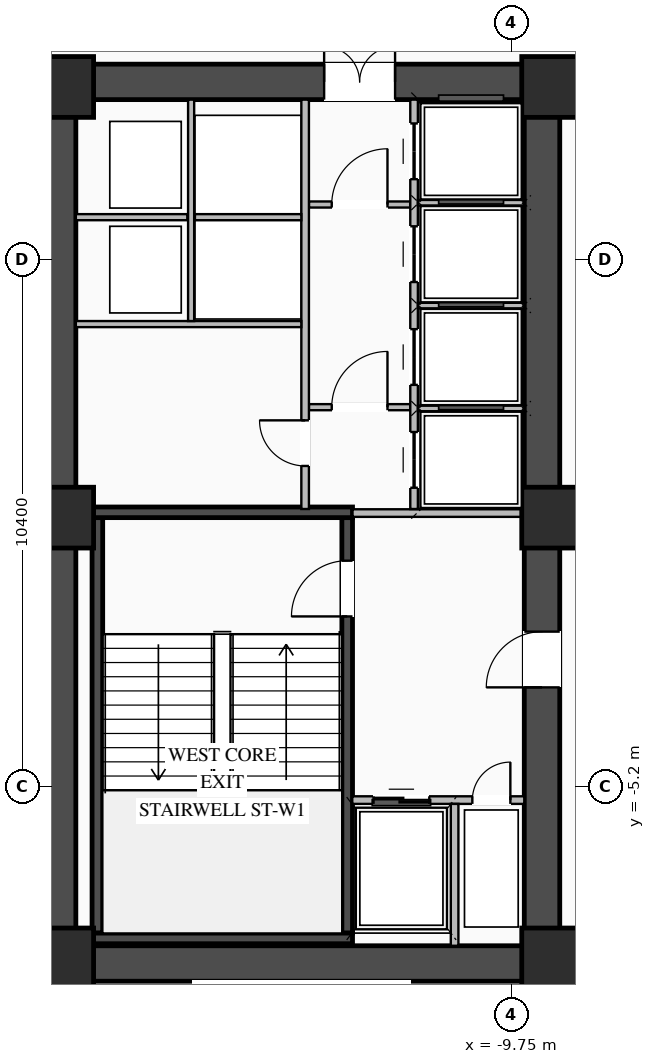
"""IFC4 building model, lengths in metres.
Left out: names, types, materials, properties, quantities, classifications, styles, units other than length and angle.
Written with IfcOpenShell. Run it as: python <this file> out.ifc"""

import sys

from ifc_helpers import new_model, si_unit, direction, frame, frame_2d, origin, origin_2d, place, context, subcontext, project, spatial, rectangle, extrude, element, fill, save


model = new_model("IFC4")
c1 = context("Model", 3, precision=1e-05, world=origin(), true_north=direction((0.0, 1.0)))
c2 = subcontext(c1, "Body", "Model", "MODEL_VIEW")
j1 = project(units=[si_unit("LENGTHUNIT", "METRE"), si_unit("PLANEANGLEUNIT", "RADIAN")], contexts=[c1])
p1 = place(None, origin())
s1 = spatial("IfcSite", under=j1, at=p1, CompositionType="ELEMENT")
p2 = place(p1, origin())
s2 = spatial("IfcBuilding", under=s1, at=p2, CompositionType="ELEMENT")
p3 = place(p2, frame((0.0, 0.0, 9.6)))
s3 = spatial("IfcBuildingStorey", under=s2, at=p3, CompositionType="ELEMENT", Elevation=9.6)
p4 = place(p3, frame((-19.05, -8.7, 0.0), z_axis=(0.0, 0.0, 1.0), x_axis=(1.0, 0.0, 0.0)))
e1 = element("IfcWall", 1, at=p4, inside=s3, PredefinedType="SHEAR", context=c2, shape_type="SweptSolid", body=[
    extrude(rectangle(XDim=10.25, YDim=0.7, at=frame_2d((5.125, 0.0))), origin(), (0.0, 0.0, 1.0), 4.25),
])
p5 = place(p3, frame((-19.05, 8.7, 0.0), z_axis=(0.0, 0.0, 1.0), x_axis=(1.0, 0.0, 0.0)))
e2 = element("IfcWall", 2, at=p5, inside=s3, PredefinedType="SHEAR", context=c2, shape_type="SweptSolid", body=[
    extrude(rectangle(XDim=10.25, YDim=0.7, at=frame_2d((5.125, 0.0))), origin(), (0.0, 0.0, 1.0), 4.25),
])
p6 = place(p5, frame((5.6, 0.0, 0.0)))
e3 = element("IfcOpeningElement", 3, at=p6, cuts=e2, PredefinedType="OPENING", context=c2, shape_type="SweptSolid", body=[
    extrude(rectangle(XDim=1.4, YDim=2.05, at=frame_2d((0.7, 1.025))), frame((0.0, 0.36, 0.0), z_axis=(0.0, -1.0, 0.0), x_axis=(1.0, 0.0, 0.0)), (0.0, 0.0, 1.0), 0.72),
])
p7 = place(p3, frame((-18.7, -8.35, 0.0), z_axis=(0.0, 0.0, 1.0), x_axis=(0.0, 1.0, 0.0)))
e4 = element("IfcWall", 4, at=p7, inside=s3, PredefinedType="SHEAR", context=c2, shape_type="SweptSolid", body=[
    extrude(rectangle(XDim=16.7, YDim=0.7, at=frame_2d((8.35, 0.0))), origin(), (0.0, 0.0, 1.0), 4.25),
])
p8 = place(p3, frame((-9.15, -8.35, 0.0), z_axis=(0.0, 0.0, 1.0), x_axis=(0.0, 1.0, 0.0)))
e5 = element("IfcWall", 5, at=p8, inside=s3, PredefinedType="SHEAR", context=c2, shape_type="SweptSolid", body=[
    extrude(rectangle(XDim=16.7, YDim=0.7, at=frame_2d((8.35, 0.0))), origin(), (0.0, 0.0, 1.0), 4.25),
])
p9 = place(p8, frame((5.1, 0.0, 0.0)))
e6 = element("IfcOpeningElement", 6, at=p9, cuts=e5, PredefinedType="OPENING", context=c2, shape_type="SweptSolid", body=[
    extrude(rectangle(XDim=1.1, YDim=2.08, at=frame_2d((0.55, 1.04))), frame((0.0, 0.36, 0.0), z_axis=(0.0, -1.0, 0.0), x_axis=(1.0, 0.0, 0.0)), (0.0, 0.0, 1.0), 0.72),
])
p10 = place(p3, frame((-12.995, -8.1, 0.0), z_axis=(0.0, 0.0, 1.0), x_axis=(0.0, 1.0, 0.0)))
e7 = element("IfcWall", 7, at=p10, inside=s3, PredefinedType="SHEAR", context=c2, shape_type="SweptSolid", body=[
    extrude(rectangle(XDim=8.2, YDim=0.21, at=frame_2d((4.1, 0.0))), origin(), (0.0, 0.0, 1.0), 4.25),
])
p11 = place(p10, frame((6.25, 0.0, 0.0)))
e8 = element("IfcOpeningElement", 8, at=p11, cuts=e7, PredefinedType="OPENING", context=c2, shape_type="SweptSolid", body=[
    extrude(rectangle(XDim=1.1, YDim=2.15, at=frame_2d((0.55, 1.075))), frame((0.0, 0.115, 0.0), z_axis=(0.0, -1.0, 0.0), x_axis=(1.0, 0.0, 0.0)), (0.0, 0.0, 1.0), 0.23),
])
p12 = place(p3, frame((-17.925, -8.1, 0.0), z_axis=(0.0, 0.0, 1.0), x_axis=(0.0, 1.0, 0.0)))
e9 = element("IfcWall", 9, at=p12, inside=s3, PredefinedType="SHEAR", context=c2, shape_type="SweptSolid", body=[
    extrude(rectangle(XDim=8.2, YDim=0.21, at=frame_2d((4.1, 0.0))), origin(), (0.0, 0.0, 1.0), 4.25),
])
for number, where, z_axis, x_axis in (
    (10, (-18.03, -8.205, 0.0), (0.0, 0.0, 1.0), (1.0, 0.0, 0.0)),
    (11, (-12.89, 0.205, 0.0), (0.0, 0.0, 1.0), (-1.0, 0.0, 0.0)),
):
    element("IfcWall", number, at=place(p3, frame(where, z_axis=z_axis, x_axis=x_axis)), inside=s3, PredefinedType="SHEAR", context=c2, shape_type="SweptSolid", body=[
        extrude(rectangle(XDim=5.14, YDim=0.21, at=frame_2d((2.57, 0.0))), origin(), (0.0, 0.0, 1.0), 4.25),
    ])
for number, where, z_axis, x_axis in (
    (12, (-8.95, -8.6, 0.0), (0.0, 0.0, 1.0), (1.0, 0.0, 0.0)),
    (13, (-8.95, 0.1, 0.0), (0.0, 0.0, 1.0), (1.0, 0.0, 0.0)),
    (14, (-8.95, 8.6, 0.0), (0.0, 0.0, 1.0), (1.0, 0.0, 0.0)),
    (15, (-18.6, -8.6, 0.0), (0.0, 0.0, 1.0), (1.0, 0.0, 0.0)),
    (16, (-18.6, 0.1, 0.0), (0.0, 0.0, 1.0), (1.0, 0.0, 0.0)),
    (17, (-18.6, 8.6, 0.0), (0.0, 0.0, 1.0), (1.0, 0.0, 0.0)),
):
    element("IfcColumn", number, at=place(p3, frame(where, z_axis=z_axis, x_axis=x_axis)), inside=s3, PredefinedType="COLUMN", context=c2, shape_type="SweptSolid", body=[
        extrude(rectangle(XDim=1.2, YDim=1.2, at=origin_2d()), origin(), (0.0, 0.0, 1.0), 4.5),
    ])
p13 = place(p3, frame((-12.895, -5.475, 0.0), z_axis=(0.0, 0.0, 1.0), x_axis=(1.0, 0.0, 0.0)))
e18 = element("IfcWall", 18, at=p13, inside=s3, PredefinedType="STANDARD", context=c2, shape_type="SweptSolid", body=[
    extrude(rectangle(XDim=3.395, YDim=0.15, at=frame_2d((1.698, 0.0))), origin(), (0.0, 0.0, 1.0), 4.23),
])
p14 = place(p13, frame((0.42, 0.0, 0.0)))
e19 = element("IfcOpeningElement", 19, at=p14, cuts=e18, PredefinedType="OPENING", context=c2, shape_type="SweptSolid", body=[
    extrude(rectangle(XDim=1.1, YDim=2.15, at=frame_2d((0.55, 1.075))), frame((0.0, 0.085, 0.0), z_axis=(0.0, -1.0, 0.0), x_axis=(1.0, 0.0, 0.0)), (0.0, 0.0, 1.0), 0.17),
])
p15 = place(p13, frame((2.37, 0.0, 0.0)))
e20 = element("IfcOpeningElement", 20, at=p15, cuts=e18, PredefinedType="OPENING", context=c2, shape_type="SweptSolid", body=[
    extrude(rectangle(XDim=0.75, YDim=2.05, at=frame_2d((0.375, 1.025))), frame((0.0, 0.085, 0.0), z_axis=(0.0, -1.0, 0.0), x_axis=(1.0, 0.0, 0.0)), (0.0, 0.0, 1.0), 0.17),
])
p16 = place(p3, frame((-10.875, -8.35, 0.0), z_axis=(0.0, 0.0, 1.0), x_axis=(0.0, 1.0, 0.0)))
e21 = element("IfcWall", 21, at=p16, inside=s3, PredefinedType="STANDARD", context=c2, shape_type="SweptSolid", body=[
    extrude(rectangle(XDim=2.8, YDim=0.15, at=frame_2d((1.4, 0.0))), origin(), (0.0, 0.0, 1.0), 4.23),
])
p17 = place(p3, frame((-12.89, 0.19, 0.0), z_axis=(0.0, 0.0, 1.0), x_axis=(1.0, 0.0, 0.0)))
e22 = element("IfcWall", 22, at=p17, inside=s3, PredefinedType="STANDARD", context=c2, shape_type="SweptSolid", body=[
    extrude(rectangle(XDim=3.39, YDim=0.15, at=frame_2d((1.695, 0.0))), origin(), (0.0, 0.0, 1.0), 3.525),
])
p18 = place(p3, frame((-13.75, 2.28, 0.0), z_axis=(0.0, 0.0, 1.0), x_axis=(1.0, 0.0, 0.0)))
e23 = element("IfcWall", 23, at=p18, inside=s3, PredefinedType="STANDARD", context=c2, shape_type="SweptSolid", body=[
    extrude(rectangle(XDim=2.0, YDim=0.12, at=frame_2d((1.0, 0.0))), origin(), (0.0, 0.0, 1.0), 4.23),
])
p19 = place(p18, frame((0.45, 0.0, 0.0)))
e24 = element("IfcOpeningElement", 24, at=p19, cuts=e23, PredefinedType="OPENING", context=c2, shape_type="SweptSolid", body=[
    extrude(rectangle(XDim=1.1, YDim=2.1, at=frame_2d((0.55, 1.05))), frame((0.0, 0.07, 0.0), z_axis=(0.0, -1.0, 0.0), x_axis=(1.0, 0.0, 0.0)), (0.0, 0.0, 1.0), 0.14),
])
p20 = place(p3, frame((-13.75, 6.28, 0.0), z_axis=(0.0, 0.0, 1.0), x_axis=(1.0, 0.0, 0.0)))
e25 = element("IfcWall", 25, at=p20, inside=s3, PredefinedType="STANDARD", context=c2, shape_type="SweptSolid", body=[
    extrude(rectangle(XDim=2.0, YDim=0.12, at=frame_2d((1.0, 0.0))), origin(), (0.0, 0.0, 1.0), 4.23),
])
p21 = place(p20, frame((0.45, 0.0, 0.0)))
e26 = element("IfcOpeningElement", 26, at=p21, cuts=e25, PredefinedType="OPENING", context=c2, shape_type="SweptSolid", body=[
    extrude(rectangle(XDim=1.1, YDim=2.1, at=frame_2d((0.55, 1.05))), frame((0.0, 0.07, 0.0), z_axis=(0.0, -1.0, 0.0), x_axis=(1.0, 0.0, 0.0)), (0.0, 0.0, 1.0), 0.14),
])
p22 = place(p3, frame((-11.675, 0.27, 0.0), z_axis=(0.0, 0.0, 1.0), x_axis=(0.0, 1.0, 0.0)))
e27 = element("IfcWall", 27, at=p22, inside=s3, PredefinedType="STANDARD", context=c2, shape_type="SweptSolid", body=[
    extrude(rectangle(XDim=8.08, YDim=0.15, at=frame_2d((4.04, 0.0))), origin(), (0.0, 0.0, 1.0), 4.23),
])
p23 = place(p22, frame((0.42, 0.0, 0.0)))
e28 = element("IfcOpeningElement", 28, at=p23, cuts=e27, PredefinedType="OPENING", context=c2, shape_type="SweptSolid", body=[
    extrude(rectangle(XDim=1.1, YDim=2.1, at=frame_2d((0.55, 1.05))), frame((0.0, 0.085, 0.0), z_axis=(0.0, -1.0, 0.0), x_axis=(1.0, 0.0, 0.0)), (0.0, 0.0, 1.0), 0.17),
])
p24 = place(p22, frame((2.45, 0.0, 0.0)))
e29 = element("IfcOpeningElement", 29, at=p24, cuts=e27, PredefinedType="OPENING", context=c2, shape_type="SweptSolid", body=[
    extrude(rectangle(XDim=1.1, YDim=2.1, at=frame_2d((0.55, 1.05))), frame((0.0, 0.085, 0.0), z_axis=(0.0, -1.0, 0.0), x_axis=(1.0, 0.0, 0.0)), (0.0, 0.0, 1.0), 0.17),
])
p25 = place(p22, frame((4.48, 0.0, 0.0)))
e30 = element("IfcOpeningElement", 30, at=p25, cuts=e27, PredefinedType="OPENING", context=c2, shape_type="SweptSolid", body=[
    extrude(rectangle(XDim=1.1, YDim=2.1, at=frame_2d((0.55, 1.05))), frame((0.0, 0.085, 0.0), z_axis=(0.0, -1.0, 0.0), x_axis=(1.0, 0.0, 0.0)), (0.0, 0.0, 1.0), 0.17),
])
p26 = place(p22, frame((6.51, 0.0, 0.0)))
e31 = element("IfcOpeningElement", 31, at=p26, cuts=e27, PredefinedType="OPENING", context=c2, shape_type="SweptSolid", body=[
    extrude(rectangle(XDim=1.1, YDim=2.1, at=frame_2d((0.55, 1.05))), frame((0.0, 0.085, 0.0), z_axis=(0.0, -1.0, 0.0), x_axis=(1.0, 0.0, 0.0)), (0.0, 0.0, 1.0), 0.17),
])
for number, where, z_axis, x_axis in (
    (32, (-11.6, 2.255, 0.0), (0.0, 0.0, 1.0), (1.0, 0.0, 0.0)),
    (33, (-11.6, 4.285, 0.0), (0.0, 0.0, 1.0), (1.0, 0.0, 0.0)),
    (34, (-11.6, 6.315, 0.0), (0.0, 0.0, 1.0), (1.0, 0.0, 0.0)),
):
    element("IfcWall", number, at=place(p3, frame(where, z_axis=z_axis, x_axis=x_axis)), inside=s3, PredefinedType="STANDARD", context=c2, shape_type="SweptSolid", body=[
        extrude(rectangle(XDim=2.1, YDim=0.11, at=frame_2d((1.05, 0.0))), origin(), (0.0, 0.0, 1.0), 4.23),
    ])
p27 = place(p3, frame((-13.825, 0.27, 0.0), z_axis=(0.0, 0.0, 1.0), x_axis=(0.0, 1.0, 0.0)))
e35 = element("IfcWall", 35, at=p27, inside=s3, PredefinedType="STANDARD", context=c2, shape_type="SweptSolid", body=[
    extrude(rectangle(XDim=8.08, YDim=0.15, at=frame_2d((4.04, 0.0))), origin(), (0.0, 0.0, 1.0), 4.23),
])
p28 = place(p27, frame((0.85, 0.0, 0.0)))
e36 = element("IfcOpeningElement", 36, at=p28, cuts=e35, PredefinedType="OPENING", context=c2, shape_type="SweptSolid", body=[
    extrude(rectangle(XDim=0.9, YDim=2.05, at=frame_2d((0.45, 1.025))), frame((0.0, 0.085, 0.0), z_axis=(0.0, -1.0, 0.0), x_axis=(1.0, 0.0, 0.0)), (0.0, 0.0, 1.0), 0.17),
])
p29 = place(p3, frame((-18.35, 3.92, 0.0), z_axis=(0.0, 0.0, 1.0), x_axis=(1.0, 0.0, 0.0)))
e37 = element("IfcWall", 37, at=p29, inside=s3, PredefinedType="STANDARD", context=c2, shape_type="SweptSolid", body=[
    extrude(rectangle(XDim=4.45, YDim=0.12, at=frame_2d((2.225, 0.0))), origin(), (0.0, 0.0, 1.0), 4.23),
])
p30 = place(p3, frame((-18.35, 6.03, 0.0), z_axis=(0.0, 0.0, 1.0), x_axis=(1.0, 0.0, 0.0)))
e38 = element("IfcWall", 38, at=p30, inside=s3, PredefinedType="STANDARD", context=c2, shape_type="SweptSolid", body=[
    extrude(rectangle(XDim=2.2, YDim=0.12, at=frame_2d((1.1, 0.0))), origin(), (0.0, 0.0, 1.0), 4.23),
])
p31 = place(p3, frame((-16.075, 3.98, 0.0), z_axis=(0.0, 0.0, 1.0), x_axis=(0.0, 1.0, 0.0)))
e39 = element("IfcWall", 39, at=p31, inside=s3, PredefinedType="STANDARD", context=c2, shape_type="SweptSolid", body=[
    extrude(rectangle(XDim=4.37, YDim=0.12, at=frame_2d((2.185, 0.0))), origin(), (0.0, 0.0, 1.0), 4.23),
])
p32 = place(p3, frame((-16.0, 6.03, 0.0), z_axis=(0.0, 0.0, 1.0), x_axis=(1.0, 0.0, 0.0)))
e40 = element("IfcWall", 40, at=p32, inside=s3, PredefinedType="STANDARD", context=c2, shape_type="SweptSolid", body=[
    extrude(rectangle(XDim=2.1, YDim=0.12, at=frame_2d((1.05, 0.0))), origin(), (0.0, 0.0, 1.0), 4.23),
])
p33 = place(p11, origin())
e41 = element("IfcDoor", 41, at=p33, inside=s3, OperationType="SINGLE_SWING_LEFT", PredefinedType="DOOR", context=c2, shape_type="SweptSolid", body=[
    extrude(rectangle(XDim=1.1, YDim=2.15, at=frame_2d((0.55, 1.075))), frame((0.0, 0.025, 0.0), z_axis=(0.0, -1.0, 0.0), x_axis=(1.0, 0.0, 0.0)), (0.0, 0.0, 1.0), 0.05),
])
fill(e8, e41)
p34 = place(p14, origin())
e42 = element("IfcDoor", 42, at=p34, inside=s3, OperationType="DOUBLE_DOOR_SLIDING", PredefinedType="DOOR", context=c2, shape_type="SweptSolid", body=[
    extrude(rectangle(XDim=1.1, YDim=2.15, at=frame_2d((0.55, 1.075))), frame((0.0, 0.025, 0.0), z_axis=(0.0, -1.0, 0.0), x_axis=(1.0, 0.0, 0.0)), (0.0, 0.0, 1.0), 0.05),
])
fill(e19, e42)
p35 = place(p15, origin())
e43 = element("IfcDoor", 43, at=p35, inside=s3, OperationType="SINGLE_SWING_RIGHT", PredefinedType="DOOR", context=c2, shape_type="SweptSolid", body=[
    extrude(rectangle(XDim=0.75, YDim=2.05, at=frame_2d((0.375, 1.025))), frame((0.0, 0.025, 0.0), z_axis=(0.0, -1.0, 0.0), x_axis=(1.0, 0.0, 0.0)), (0.0, 0.0, 1.0), 0.05),
])
fill(e20, e43)
p36 = place(p9, origin())
e44 = element("IfcDoor", 44, at=p36, inside=s3, OperationType="SINGLE_SWING_LEFT", PredefinedType="DOOR", context=c2, shape_type="SweptSolid", body=[
    extrude(rectangle(XDim=1.1, YDim=2.08, at=frame_2d((0.55, 1.04))), frame((0.0, 0.305, 0.0), z_axis=(0.0, -1.0, 0.0), x_axis=(1.0, 0.0, 0.0)), (0.0, 0.0, 1.0), 0.05),
])
fill(e6, e44)
p37 = place(p19, origin())
e45 = element("IfcDoor", 45, at=p37, inside=s3, OperationType="SINGLE_SWING_RIGHT", PredefinedType="DOOR", context=c2, shape_type="SweptSolid", body=[
    extrude(rectangle(XDim=1.1, YDim=2.1, at=frame_2d((0.55, 1.05))), frame((0.0, 0.025, 0.0), z_axis=(0.0, -1.0, 0.0), x_axis=(1.0, 0.0, 0.0)), (0.0, 0.0, 1.0), 0.05),
])
fill(e24, e45)
p38 = place(p21, origin())
e46 = element("IfcDoor", 46, at=p38, inside=s3, OperationType="SINGLE_SWING_RIGHT", PredefinedType="DOOR", context=c2, shape_type="SweptSolid", body=[
    extrude(rectangle(XDim=1.1, YDim=2.1, at=frame_2d((0.55, 1.05))), frame((0.0, 0.025, 0.0), z_axis=(0.0, -1.0, 0.0), x_axis=(1.0, 0.0, 0.0)), (0.0, 0.0, 1.0), 0.05),
])
fill(e26, e46)
p39 = place(p6, origin())
e47 = element("IfcDoor", 47, at=p39, inside=s3, OperationType="DOUBLE_DOOR_SINGLE_SWING", PredefinedType="DOOR", context=c2, shape_type="SweptSolid", body=[
    extrude(rectangle(XDim=1.4, YDim=2.05, at=frame_2d((0.7, 1.025))), frame((0.0, 0.295, 0.0), z_axis=(0.0, -1.0, 0.0), x_axis=(1.0, 0.0, 0.0)), (0.0, 0.0, 1.0), 0.05),
])
fill(e3, e47)
p40 = place(p23, origin())
e48 = element("IfcDoor", 48, at=p40, inside=s3, OperationType="DOUBLE_DOOR_SLIDING", PredefinedType="DOOR", context=c2, shape_type="SweptSolid", body=[
    extrude(rectangle(XDim=1.1, YDim=2.1, at=frame_2d((0.55, 1.05))), frame((0.0, 0.025, 0.0), z_axis=(0.0, -1.0, 0.0), x_axis=(1.0, 0.0, 0.0)), (0.0, 0.0, 1.0), 0.05),
])
fill(e28, e48)
p41 = place(p24, origin())
e49 = element("IfcDoor", 49, at=p41, inside=s3, OperationType="DOUBLE_DOOR_SLIDING", PredefinedType="DOOR", context=c2, shape_type="SweptSolid", body=[
    extrude(rectangle(XDim=1.1, YDim=2.1, at=frame_2d((0.55, 1.05))), frame((0.0, 0.025, 0.0), z_axis=(0.0, -1.0, 0.0), x_axis=(1.0, 0.0, 0.0)), (0.0, 0.0, 1.0), 0.05),
])
fill(e29, e49)
p42 = place(p25, origin())
e50 = element("IfcDoor", 50, at=p42, inside=s3, OperationType="DOUBLE_DOOR_SLIDING", PredefinedType="DOOR", context=c2, shape_type="SweptSolid", body=[
    extrude(rectangle(XDim=1.1, YDim=2.1, at=frame_2d((0.55, 1.05))), frame((0.0, 0.025, 0.0), z_axis=(0.0, -1.0, 0.0), x_axis=(1.0, 0.0, 0.0)), (0.0, 0.0, 1.0), 0.05),
])
fill(e30, e50)
p43 = place(p26, origin())
e51 = element("IfcDoor", 51, at=p43, inside=s3, OperationType="DOUBLE_DOOR_SLIDING", PredefinedType="DOOR", context=c2, shape_type="SweptSolid", body=[
    extrude(rectangle(XDim=1.1, YDim=2.1, at=frame_2d((0.55, 1.05))), frame((0.0, 0.025, 0.0), z_axis=(0.0, -1.0, 0.0), x_axis=(1.0, 0.0, 0.0)), (0.0, 0.0, 1.0), 0.05),
])
fill(e31, e51)
p44 = place(p28, origin())
e52 = element("IfcDoor", 52, at=p44, inside=s3, OperationType="SINGLE_SWING_RIGHT", PredefinedType="DOOR", context=c2, shape_type="SweptSolid", body=[
    extrude(rectangle(XDim=0.9, YDim=2.05, at=frame_2d((0.45, 1.025))), frame((0.0, 0.025, 0.0), z_axis=(0.0, -1.0, 0.0), x_axis=(1.0, 0.0, 0.0)), (0.0, 0.0, 1.0), 0.05),
])
fill(e36, e52)
save(model, sys.argv[1])
